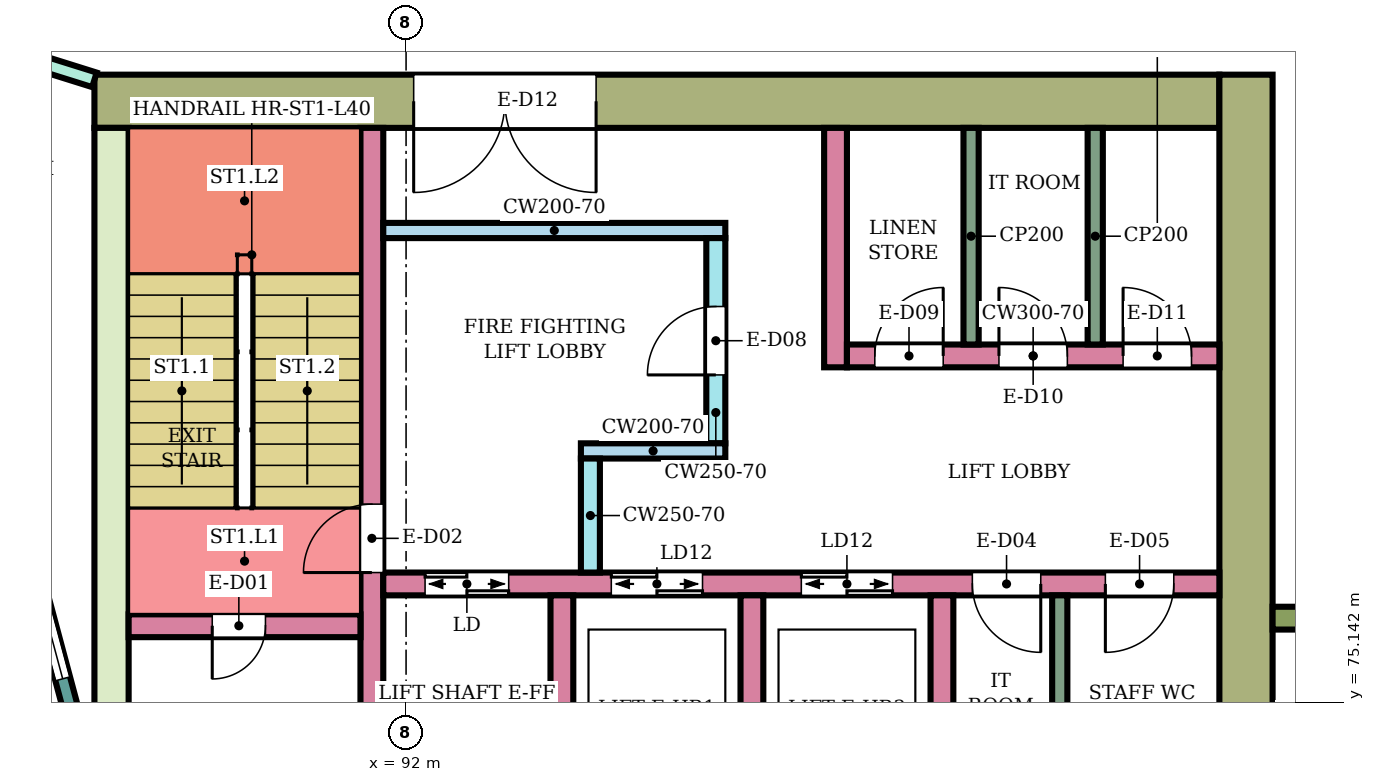
"""IFC4 building model, lengths in metres.
Left out: names, types, materials, properties, quantities, classifications, styles, units other than length and angle.
Written with IfcOpenShell. Run it as: python <this file> out.ifc"""

import sys

from ifc_helpers import new_model, si_unit, direction, frame, frame_2d, origin, place, context, subcontext, project, spatial, rectangle, extrude, element, fill, save


model = new_model("IFC4")
c1 = context("Model", 3, precision=1e-05, world=origin(), true_north=direction((0.0, 1.0)))
c2 = subcontext(c1, "Body", "Model", "MODEL_VIEW")
j1 = project(units=[si_unit("LENGTHUNIT", "METRE"), si_unit("PLANEANGLEUNIT", "RADIAN")], contexts=[c1])
p1 = place(None, origin())
s1 = spatial("IfcSite", under=j1, at=p1, CompositionType="ELEMENT")
p2 = place(p1, origin())
s2 = spatial("IfcBuilding", under=s1, at=p2, CompositionType="ELEMENT")
p3 = place(p2, frame((0.0, 0.0, 174.1)))
s3 = spatial("IfcBuildingStorey", under=s2, at=p3, CompositionType="ELEMENT", Elevation=174.1)
p4 = place(p3, frame((87.9, 83.05, 0.0), z_axis=(0.0, 0.0, 1.0), x_axis=(1.0, 0.0, 0.0)))
e1 = element("IfcWall", 1, at=p4, inside=s3, PredefinedType="SHEAR", context=c2, shape_type="SweptSolid", body=[
    extrude(rectangle(XDim=14.8, YDim=0.7, at=frame_2d((7.4, 0.0))), origin(), (0.0, 0.0, 1.0), 3.78),
])
p5 = place(p4, frame((4.2, 0.0, 0.0)))
e2 = element("IfcOpeningElement", 2, at=p5, cuts=e1, PredefinedType="OPENING", context=c2, shape_type="SweptSolid", body=[
    extrude(rectangle(XDim=2.4, YDim=2.4, at=frame_2d((1.2, 1.2))), frame((0.0, 0.36, 0.0), z_axis=(0.0, -1.0, 0.0), x_axis=(1.0, 0.0, 0.0)), (0.0, 0.0, 1.0), 0.72),
])
p6 = place(p3, frame((88.125, 75.0, 0.0), z_axis=(0.0, 0.0, 1.0), x_axis=(0.0, 1.0, 0.0)))
e3 = element("IfcWall", 3, at=p6, inside=s3, PredefinedType="SHEAR", context=c2, shape_type="SweptSolid", body=[
    extrude(rectangle(XDim=7.7, YDim=0.45, at=frame_2d((3.85, 0.0))), origin(), (0.0, 0.0, 1.0), 3.78),
])
p7 = place(p3, frame((103.05, 66.6, 0.0), z_axis=(0.0, 0.0, 1.0), x_axis=(0.0, 1.0, 0.0)))
e4 = element("IfcWall", 4, at=p7, inside=s3, PredefinedType="SHEAR", context=c2, shape_type="SweptSolid", body=[
    extrude(rectangle(XDim=16.8, YDim=0.7, at=frame_2d((8.4, 0.0))), origin(), (0.0, 0.0, 1.0), 3.78),
])
p8 = place(p3, frame((91.55, 75.0, 0.0), z_axis=(0.0, 0.0, 1.0), x_axis=(0.0, 1.0, 0.0)))
e5 = element("IfcWall", 5, at=p8, inside=s3, PredefinedType="SHEAR", context=c2, shape_type="SweptSolid", body=[
    extrude(rectangle(XDim=7.7, YDim=0.3, at=frame_2d((3.85, 0.0))), origin(), (0.0, 0.0, 1.0), 3.78),
])
p9 = place(p8, frame((1.85, 0.0, 0.0)))
e6 = element("IfcOpeningElement", 6, at=p9, cuts=e5, PredefinedType="OPENING", context=c2, shape_type="SweptSolid", body=[
    extrude(rectangle(XDim=0.9, YDim=2.1, at=frame_2d((0.45, 1.05))), frame((0.0, 0.16, 0.0), z_axis=(0.0, -1.0, 0.0), x_axis=(1.0, 0.0, 0.0)), (0.0, 0.0, 1.0), 0.32),
])
p10 = place(p3, frame((88.35, 76.15, 0.0), z_axis=(0.0, 0.0, 1.0), x_axis=(1.0, 0.0, 0.0)))
e7 = element("IfcWall", 7, at=p10, inside=s3, PredefinedType="SHEAR", context=c2, shape_type="SweptSolid", body=[
    extrude(rectangle(XDim=3.05, YDim=0.3, at=frame_2d((1.525, 0.0))), origin(), (0.0, 0.0, 1.0), 3.78),
])
p11 = place(p10, frame((1.1, 0.0, 0.0)))
e8 = element("IfcOpeningElement", 8, at=p11, cuts=e7, PredefinedType="OPENING", context=c2, shape_type="SweptSolid", body=[
    extrude(rectangle(XDim=0.7, YDim=2.0, at=frame_2d((0.35, 1.0))), frame((0.0, 0.16, 0.0), z_axis=(0.0, -1.0, 0.0), x_axis=(1.0, 0.0, 0.0)), (0.0, 0.0, 1.0), 0.32),
])
p12 = place(p3, frame((91.7, 76.7, 0.0), z_axis=(0.0, 0.0, 1.0), x_axis=(1.0, 0.0, 0.0)))
e9 = element("IfcWall", 9, at=p12, inside=s3, PredefinedType="SHEAR", context=c2, shape_type="SweptSolid", body=[
    extrude(rectangle(XDim=11.0, YDim=0.3, at=frame_2d((5.5, 0.0))), origin(), (0.0, 0.0, 1.0), 3.78),
])
p13 = place(p12, frame((0.55, 0.0, 0.0)))
e10 = element("IfcOpeningElement", 10, at=p13, cuts=e9, PredefinedType="OPENING", context=c2, shape_type="SweptSolid", body=[
    extrude(rectangle(XDim=1.1, YDim=2.1, at=frame_2d((0.55, 1.05))), frame((0.0, 0.16, 0.0), z_axis=(0.0, -1.0, 0.0), x_axis=(1.0, 0.0, 0.0)), (0.0, 0.0, 1.0), 0.32),
])
p14 = place(p12, frame((3.0, 0.0, 0.0)))
e11 = element("IfcOpeningElement", 11, at=p14, cuts=e9, PredefinedType="OPENING", context=c2, shape_type="SweptSolid", body=[
    extrude(rectangle(XDim=1.2, YDim=2.1, at=frame_2d((0.6, 1.05))), frame((0.0, 0.16, 0.0), z_axis=(0.0, -1.0, 0.0), x_axis=(1.0, 0.0, 0.0)), (0.0, 0.0, 1.0), 0.32),
])
p15 = place(p12, frame((5.5, 0.0, 0.0)))
e12 = element("IfcOpeningElement", 12, at=p15, cuts=e9, PredefinedType="OPENING", context=c2, shape_type="SweptSolid", body=[
    extrude(rectangle(XDim=1.2, YDim=2.1, at=frame_2d((0.6, 1.05))), frame((0.0, 0.16, 0.0), z_axis=(0.0, -1.0, 0.0), x_axis=(1.0, 0.0, 0.0)), (0.0, 0.0, 1.0), 0.32),
])
p16 = place(p12, frame((7.75, 0.0, 0.0)))
e13 = element("IfcOpeningElement", 13, at=p16, cuts=e9, PredefinedType="OPENING", context=c2, shape_type="SweptSolid", body=[
    extrude(rectangle(XDim=0.9, YDim=2.1, at=frame_2d((0.45, 1.05))), frame((0.0, 0.16, 0.0), z_axis=(0.0, -1.0, 0.0), x_axis=(1.0, 0.0, 0.0)), (0.0, 0.0, 1.0), 0.32),
])
p17 = place(p12, frame((9.5, 0.0, 0.0)))
e14 = element("IfcOpeningElement", 14, at=p17, cuts=e9, PredefinedType="OPENING", context=c2, shape_type="SweptSolid", body=[
    extrude(rectangle(XDim=0.9, YDim=2.1, at=frame_2d((0.45, 1.05))), frame((0.0, 0.16, 0.0), z_axis=(0.0, -1.0, 0.0), x_axis=(1.0, 0.0, 0.0)), (0.0, 0.0, 1.0), 0.32),
])
for number, where, z_axis, x_axis in (
    (15, (94.05, 74.0, 0.0), (0.0, 0.0, 1.0), (0.0, 1.0, 0.0)),
    (16, (96.55, 74.0, 0.0), (0.0, 0.0, 1.0), (0.0, 1.0, 0.0)),
    (17, (99.05, 74.0, 0.0), (0.0, 0.0, 1.0), (0.0, 1.0, 0.0)),
):
    element("IfcWall", number, at=place(p3, frame(where, z_axis=z_axis, x_axis=x_axis)), inside=s3, PredefinedType="SHEAR", context=c2, shape_type="SweptSolid", body=[
        extrude(rectangle(XDim=2.55, YDim=0.3, at=frame_2d((1.275, 0.0))), origin(), (0.0, 0.0, 1.0), 3.78),
    ])
p18 = place(p3, frame((91.7, 81.35, 0.0), z_axis=(0.0, 0.0, 1.0), x_axis=(1.0, 0.0, 0.0)))
e18 = element("IfcWall", 18, at=p18, inside=s3, PredefinedType="SHEAR", context=c2, shape_type="SweptSolid", body=[
    extrude(rectangle(XDim=4.5, YDim=0.2, at=frame_2d((2.25, 0.0))), origin(), (0.0, 0.0, 1.0), 3.78),
])
p19 = place(p3, frame((96.075, 78.55, 0.0), z_axis=(0.0, 0.0, 1.0), x_axis=(0.0, 1.0, 0.0)))
e19 = element("IfcWall", 19, at=p19, inside=s3, PredefinedType="SHEAR", context=c2, shape_type="SweptSolid", body=[
    extrude(rectangle(XDim=2.7, YDim=0.25, at=frame_2d((1.35, 0.0))), origin(), (0.0, 0.0, 1.0), 3.78),
])
p20 = place(p19, frame((0.9, 0.0, 0.0)))
e20 = element("IfcOpeningElement", 20, at=p20, cuts=e19, PredefinedType="OPENING", context=c2, shape_type="SweptSolid", body=[
    extrude(rectangle(XDim=0.9, YDim=2.1, at=frame_2d((0.45, 1.05))), frame((0.0, 0.135, 0.0), z_axis=(0.0, -1.0, 0.0), x_axis=(1.0, 0.0, 0.0)), (0.0, 0.0, 1.0), 0.27),
])
p21 = place(p3, frame((94.3, 78.45, 0.0), z_axis=(0.0, 0.0, 1.0), x_axis=(1.0, 0.0, 0.0)))
e21 = element("IfcWall", 21, at=p21, inside=s3, PredefinedType="SHEAR", context=c2, shape_type="SweptSolid", body=[
    extrude(rectangle(XDim=1.9, YDim=0.2, at=frame_2d((0.95, 0.0))), origin(), (0.0, 0.0, 1.0), 3.78),
])
p22 = place(p3, frame((94.425, 76.85, 0.0), z_axis=(0.0, 0.0, 1.0), x_axis=(0.0, 1.0, 0.0)))
e22 = element("IfcWall", 22, at=p22, inside=s3, PredefinedType="SHEAR", context=c2, shape_type="SweptSolid", body=[
    extrude(rectangle(XDim=1.5, YDim=0.25, at=frame_2d((0.75, 0.0))), origin(), (0.0, 0.0, 1.0), 3.78),
])
p23 = place(p3, frame((97.65, 79.55, 0.0), z_axis=(0.0, 0.0, 1.0), x_axis=(0.0, 1.0, 0.0)))
e23 = element("IfcWall", 23, at=p23, inside=s3, PredefinedType="SHEAR", context=c2, shape_type="SweptSolid", body=[
    extrude(rectangle(XDim=3.15, YDim=0.3, at=frame_2d((1.575, 0.0))), origin(), (0.0, 0.0, 1.0), 3.78),
])
p24 = place(p3, frame((97.8, 79.7, 0.0), z_axis=(0.0, 0.0, 1.0), x_axis=(1.0, 0.0, 0.0)))
e24 = element("IfcWall", 24, at=p24, inside=s3, PredefinedType="SHEAR", context=c2, shape_type="SweptSolid", body=[
    extrude(rectangle(XDim=4.9, YDim=0.3, at=frame_2d((2.45, 0.0))), origin(), (0.0, 0.0, 1.0), 3.78),
])
p25 = place(p24, frame((0.367, 0.0, 0.0)))
e25 = element("IfcOpeningElement", 25, at=p25, cuts=e24, PredefinedType="OPENING", context=c2, shape_type="SweptSolid", body=[
    extrude(rectangle(XDim=0.9, YDim=2.1, at=frame_2d((0.45, 1.05))), frame((0.0, 0.16, 0.0), z_axis=(0.0, -1.0, 0.0), x_axis=(1.0, 0.0, 0.0)), (0.0, 0.0, 1.0), 0.32),
])
p26 = place(p24, frame((2.0, 0.0, 0.0)))
e26 = element("IfcOpeningElement", 26, at=p26, cuts=e24, PredefinedType="OPENING", context=c2, shape_type="SweptSolid", body=[
    extrude(rectangle(XDim=0.9, YDim=2.1, at=frame_2d((0.45, 1.05))), frame((0.0, 0.16, 0.0), z_axis=(0.0, -1.0, 0.0), x_axis=(1.0, 0.0, 0.0)), (0.0, 0.0, 1.0), 0.32),
])
p27 = place(p24, frame((3.633, 0.0, 0.0)))
e27 = element("IfcOpeningElement", 27, at=p27, cuts=e24, PredefinedType="OPENING", context=c2, shape_type="SweptSolid", body=[
    extrude(rectangle(XDim=0.9, YDim=2.1, at=frame_2d((0.45, 1.05))), frame((0.0, 0.16, 0.0), z_axis=(0.0, -1.0, 0.0), x_axis=(1.0, 0.0, 0.0)), (0.0, 0.0, 1.0), 0.32),
])
p28 = place(p3, frame((103.4, 76.25, 0.0), z_axis=(0.0, 0.0, 1.0), x_axis=(1.0, 0.0, 0.0)))
e28 = element("IfcWall", 28, at=p28, inside=s3, PredefinedType="NOTDEFINED", context=c2, shape_type="SweptSolid", body=[
    extrude(rectangle(XDim=2.416, YDim=0.3, at=frame_2d((1.208, 0.0))), origin(), (0.0, 0.0, 1.0), 4.1),
])
p29 = place(p3, frame((87.604, 75.0, 0.0), z_axis=(0.0, 0.0, 1.0), x_axis=(-0.258789828301, 0.965933654434, 0.0)))
e29 = element("IfcWall", 29, at=p29, inside=s3, PredefinedType="NOTDEFINED", context=c2, shape_type="SweptSolid", body=[
    extrude(rectangle(XDim=3.936, YDim=0.2, at=frame_2d((1.968, 0.0))), origin(), (0.0, 0.0, 1.0), 4.1),
])
p30 = place(p29, frame((0.468, 0.0, 0.9)))
e30 = element("IfcOpeningElement", 30, at=p30, cuts=e29, PredefinedType="OPENING", context=c2, shape_type="SweptSolid", body=[
    extrude(rectangle(XDim=3.0, YDim=2.3, at=frame_2d((1.5, 1.15))), frame((0.0, 0.11, 0.0), z_axis=(0.0, -1.0, 0.0), x_axis=(1.0, 0.0, 0.0)), (0.0, 0.0, 1.0), 0.22),
])
p31 = place(p3, frame((85.587, 84.057, 0.0), z_axis=(0.0, 0.0, 1.0), x_axis=(0.954239513179, -0.299043393987, 0.0)))
e31 = element("IfcWall", 31, at=p31, inside=s3, PredefinedType="PARTITIONING", context=c2, shape_type="SweptSolid", body=[
    extrude(rectangle(XDim=2.424, YDim=0.2, at=frame_2d((1.212, 0.0))), origin(), (0.0, 0.0, 1.0), 3.65),
])
p32 = place(p31, frame((0.762, 0.0, 0.0)))
e32 = element("IfcOpeningElement", 32, at=p32, cuts=e31, PredefinedType="OPENING", context=c2, shape_type="SweptSolid", body=[
    extrude(rectangle(XDim=0.9, YDim=2.1, at=frame_2d((0.45, 1.05))), frame((0.0, 0.11, 0.0), z_axis=(0.0, -1.0, 0.0), x_axis=(1.0, 0.0, 0.0)), (0.0, 0.0, 1.0), 0.22),
])
p33 = place(p3, frame((100.6, 74.0, 0.0), z_axis=(0.0, 0.0, 1.0), x_axis=(0.0, 1.0, 0.0)))
e33 = element("IfcWall", 33, at=p33, inside=s3, PredefinedType="PARTITIONING", context=c2, shape_type="SweptSolid", body=[
    extrude(rectangle(XDim=2.55, YDim=0.2, at=frame_2d((1.275, 0.0))), origin(), (0.0, 0.0, 1.0), 3.78),
])
for number, where, z_axis, x_axis in (
    (34, (99.433, 79.85, 0.0), (0.0, 0.0, 1.0), (0.0, 1.0, 0.0)),
    (35, (101.067, 79.85, 0.0), (0.0, 0.0, 1.0), (0.0, 1.0, 0.0)),
):
    element("IfcWall", number, at=place(p3, frame(where, z_axis=z_axis, x_axis=x_axis)), inside=s3, PredefinedType="PARTITIONING", context=c2, shape_type="SweptSolid", body=[
        extrude(rectangle(XDim=2.85, YDim=0.2, at=frame_2d((1.425, 0.0))), origin(), (0.0, 0.0, 1.0), 3.78),
    ])
p34 = place(p30, origin())
e36 = element("IfcWindow", 36, at=p34, inside=s3, PartitioningType="SINGLE_PANEL", PredefinedType="WINDOW", context=c2, shape_type="SweptSolid", body=[
    extrude(rectangle(XDim=3.0, YDim=2.3, at=frame_2d((1.5, 1.15))), frame((0.0, 0.03, 0.0), z_axis=(0.0, -1.0, 0.0), x_axis=(1.0, 0.0, 0.0)), (0.0, 0.0, 1.0), 0.06),
])
fill(e30, e36)
p35 = place(p11, frame((0.7, 0.0, 0.0), z_axis=(0.0, 0.0, 1.0), x_axis=(-1.0, 0.0, 0.0)))
e37 = element("IfcDoor", 37, at=p35, inside=s3, OperationType="SINGLE_SWING_RIGHT", PredefinedType="DOOR", context=c2, shape_type="SweptSolid", body=[
    extrude(rectangle(XDim=0.7, YDim=2.0, at=frame_2d((0.35, 1.0))), frame((0.0, 0.025, 0.0), z_axis=(0.0, -1.0, 0.0), x_axis=(1.0, 0.0, 0.0)), (0.0, 0.0, 1.0), 0.05),
])
fill(e8, e37)
p36 = place(p9, origin())
e38 = element("IfcDoor", 38, at=p36, inside=s3, OperationType="SINGLE_SWING_LEFT", PredefinedType="DOOR", context=c2, shape_type="SweptSolid", body=[
    extrude(rectangle(XDim=0.9, YDim=2.1, at=frame_2d((0.45, 1.05))), frame((0.0, 0.025, 0.0), z_axis=(0.0, -1.0, 0.0), x_axis=(1.0, 0.0, 0.0)), (0.0, 0.0, 1.0), 0.05),
])
fill(e6, e38)
p37 = place(p13, origin())
e39 = element("IfcDoor", 39, at=p37, inside=s3, OperationType="DOUBLE_DOOR_SLIDING", PredefinedType="DOOR", context=c2, shape_type="SweptSolid", body=[
    extrude(rectangle(XDim=1.1, YDim=2.1, at=frame_2d((0.55, 1.05))), frame((0.0, 0.025, 0.0), z_axis=(0.0, -1.0, 0.0), x_axis=(1.0, 0.0, 0.0)), (0.0, 0.0, 1.0), 0.05),
])
fill(e10, e39)
p38 = place(p14, origin())
e40 = element("IfcDoor", 40, at=p38, inside=s3, OperationType="DOUBLE_DOOR_SLIDING", PredefinedType="DOOR", context=c2, shape_type="SweptSolid", body=[
    extrude(rectangle(XDim=1.2, YDim=2.1, at=frame_2d((0.6, 1.05))), frame((0.0, 0.025, 0.0), z_axis=(0.0, -1.0, 0.0), x_axis=(1.0, 0.0, 0.0)), (0.0, 0.0, 1.0), 0.05),
])
fill(e11, e40)
p39 = place(p15, origin())
e41 = element("IfcDoor", 41, at=p39, inside=s3, OperationType="DOUBLE_DOOR_SLIDING", PredefinedType="DOOR", context=c2, shape_type="SweptSolid", body=[
    extrude(rectangle(XDim=1.2, YDim=2.1, at=frame_2d((0.6, 1.05))), frame((0.0, 0.025, 0.0), z_axis=(0.0, -1.0, 0.0), x_axis=(1.0, 0.0, 0.0)), (0.0, 0.0, 1.0), 0.05),
])
fill(e12, e41)
p40 = place(p16, frame((0.9, 0.0, 0.0), z_axis=(0.0, 0.0, 1.0), x_axis=(-1.0, 0.0, 0.0)))
e42 = element("IfcDoor", 42, at=p40, inside=s3, OperationType="SINGLE_SWING_LEFT", PredefinedType="DOOR", context=c2, shape_type="SweptSolid", body=[
    extrude(rectangle(XDim=0.9, YDim=2.1, at=frame_2d((0.45, 1.05))), frame((0.0, 0.025, 0.0), z_axis=(0.0, -1.0, 0.0), x_axis=(1.0, 0.0, 0.0)), (0.0, 0.0, 1.0), 0.05),
])
fill(e13, e42)
p41 = place(p17, frame((0.9, 0.0, 0.0), z_axis=(0.0, 0.0, 1.0), x_axis=(-1.0, 0.0, 0.0)))
e43 = element("IfcDoor", 43, at=p41, inside=s3, OperationType="SINGLE_SWING_RIGHT", PredefinedType="DOOR", context=c2, shape_type="SweptSolid", body=[
    extrude(rectangle(XDim=0.9, YDim=2.1, at=frame_2d((0.45, 1.05))), frame((0.0, 0.025, 0.0), z_axis=(0.0, -1.0, 0.0), x_axis=(1.0, 0.0, 0.0)), (0.0, 0.0, 1.0), 0.05),
])
fill(e14, e43)
p42 = place(p20, origin())
e44 = element("IfcDoor", 44, at=p42, inside=s3, OperationType="SINGLE_SWING_LEFT", PredefinedType="DOOR", context=c2, shape_type="SweptSolid", body=[
    extrude(rectangle(XDim=0.9, YDim=2.1, at=frame_2d((0.45, 1.05))), frame((0.0, 0.025, 0.0), z_axis=(0.0, -1.0, 0.0), x_axis=(1.0, 0.0, 0.0)), (0.0, 0.0, 1.0), 0.05),
])
fill(e20, e44)
p43 = place(p25, origin())
e45 = element("IfcDoor", 45, at=p43, inside=s3, OperationType="SINGLE_SWING_RIGHT", PredefinedType="DOOR", context=c2, shape_type="SweptSolid", body=[
    extrude(rectangle(XDim=0.9, YDim=2.1, at=frame_2d((0.45, 1.05))), frame((0.0, 0.025, 0.0), z_axis=(0.0, -1.0, 0.0), x_axis=(1.0, 0.0, 0.0)), (0.0, 0.0, 1.0), 0.05),
])
fill(e25, e45)
p44 = place(p26, origin())
e46 = element("IfcDoor", 46, at=p44, inside=s3, OperationType="SINGLE_SWING_LEFT", PredefinedType="DOOR", context=c2, shape_type="SweptSolid", body=[
    extrude(rectangle(XDim=0.9, YDim=2.1, at=frame_2d((0.45, 1.05))), frame((0.0, 0.025, 0.0), z_axis=(0.0, -1.0, 0.0), x_axis=(1.0, 0.0, 0.0)), (0.0, 0.0, 1.0), 0.05),
])
fill(e26, e46)
p45 = place(p27, origin())
e47 = element("IfcDoor", 47, at=p45, inside=s3, OperationType="SINGLE_SWING_LEFT", PredefinedType="DOOR", context=c2, shape_type="SweptSolid", body=[
    extrude(rectangle(XDim=0.9, YDim=2.1, at=frame_2d((0.45, 1.05))), frame((0.0, 0.025, 0.0), z_axis=(0.0, -1.0, 0.0), x_axis=(1.0, 0.0, 0.0)), (0.0, 0.0, 1.0), 0.05),
])
fill(e27, e47)
p46 = place(p5, frame((2.4, 0.0, 0.0), z_axis=(0.0, 0.0, 1.0), x_axis=(-1.0, 0.0, 0.0)))
e48 = element("IfcDoor", 48, at=p46, inside=s3, OperationType="DOUBLE_DOOR_SINGLE_SWING", PredefinedType="DOOR", context=c2, shape_type="SweptSolid", body=[
    extrude(rectangle(XDim=2.4, YDim=2.4, at=frame_2d((1.2, 1.2))), frame((0.0, 0.025, 0.0), z_axis=(0.0, -1.0, 0.0), x_axis=(1.0, 0.0, 0.0)), (0.0, 0.0, 1.0), 0.05),
])
fill(e2, e48)
save(model, sys.argv[1])
